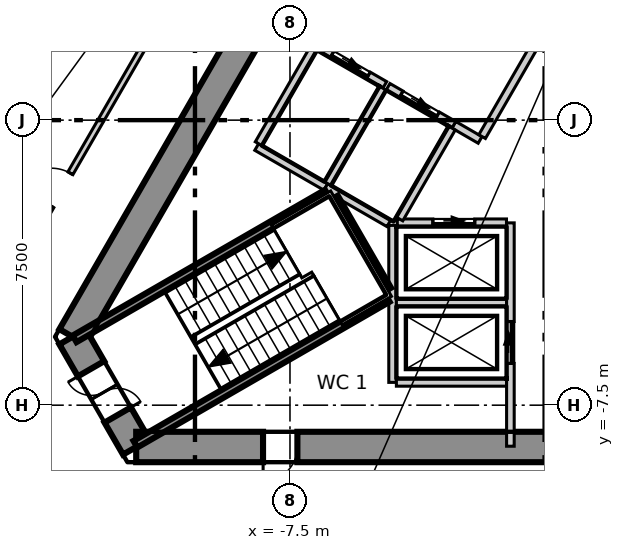
"""IFC4 building model, lengths in metres.
Left out: names, types, materials, properties, quantities, classifications, styles, units other than length and angle.
Written with IfcOpenShell. Run it as: python <this file> out.ifc"""

import sys

from ifc_helpers import new_model, si_unit, direction, frame, frame_2d, origin, place, context, subcontext, project, spatial, polyline, rectangle, outline, extrude, element, fill, save


model = new_model("IFC4")
c1 = context("Model", 3, precision=1e-05, world=origin(), true_north=direction((0.0, 1.0)))
c2 = subcontext(c1, "Body", "Model", "MODEL_VIEW")
j1 = project(units=[si_unit("LENGTHUNIT", "METRE"), si_unit("PLANEANGLEUNIT", "RADIAN")], contexts=[c1])
p1 = place(None, origin())
s1 = spatial("IfcSite", under=j1, at=p1, CompositionType="ELEMENT")
p2 = place(p1, origin())
s2 = spatial("IfcBuilding", under=s1, at=p2, CompositionType="ELEMENT")
p3 = place(p2, frame((0.0, 0.0, 164.3)))
s3 = spatial("IfcBuildingStorey", under=s2, at=p3, CompositionType="ELEMENT", Elevation=164.3)
p4 = place(p3, frame((-1.674, 14.3, -0.3), z_axis=(0.0, 0.0, 1.0), x_axis=(-0.499995765644, -0.866027848477, 0.0)))
e1 = element("IfcWall", 1, at=p4, inside=s3, PredefinedType="SHEAR", context=c2, shape_type="SweptSolid", body=[
    extrude(outline(polyline([(-0.231, -0.4), (1.732, -0.4), (3.695, -0.4), (5.658, -0.4), (7.621, -0.4), (9.584, -0.4), (11.547, -0.4), (13.51, -0.4), (15.473, -0.4), (17.436, -0.4), (19.399, -0.4), (21.362, -0.4), (23.325, -0.4), (22.863, 0.4), (20.977, 0.4), (19.091, 0.4), (17.205, 0.4), (15.319, 0.4), (13.433, 0.4), (11.547, 0.4), (9.661, 0.4), (7.775, 0.4), (5.889, 0.4), (4.003, 0.4), (2.117, 0.4), (0.231, 0.4), (-0.231, -0.4)])), origin(), (0.0, 0.0, 1.0), 4.0),
])
p5 = place(p4, frame((10.997, 0.0, 0.3)))
e2 = element("IfcOpeningElement", 2, at=p5, cuts=e1, PredefinedType="OPENING", context=c2, shape_type="SweptSolid", body=[
    extrude(rectangle(XDim=1.1, YDim=2.1, at=frame_2d((0.55, 1.05))), frame((0.0, 0.41, 0.0), z_axis=(0.0, -1.0, 0.0), x_axis=(1.0, 0.0, 0.0)), (0.0, 0.0, 1.0), 0.82),
])
p6 = place(p3, frame((-13.221, -5.7, -0.3), z_axis=(0.0, 0.0, 1.0), x_axis=(0.49987182685, -0.866099391942, 0.0)))
e3 = element("IfcWall", 3, at=p6, inside=s3, PredefinedType="SHEAR", context=c2, shape_type="SweptSolid", body=[
    extrude(outline(polyline([(-0.231, -0.4), (1.674, -0.4), (3.579, -0.4), (3.118, 0.4), (1.674, 0.4), (0.231, 0.4), (-0.231, -0.4)])), origin(), (0.0, 0.0, 1.0), 4.0),
])
p7 = place(p6, frame((0.974, 0.0, 0.3)))
e4 = element("IfcOpeningElement", 4, at=p7, cuts=e3, PredefinedType="OPENING", context=c2, shape_type="SweptSolid", body=[
    extrude(rectangle(XDim=1.4, YDim=2.1, at=frame_2d((0.7, 1.05))), frame((0.0, 0.41, 0.0), z_axis=(0.0, -1.0, 0.0), x_axis=(1.0, 0.0, 0.0)), (0.0, 0.0, 1.0), 0.82),
])
p8 = place(p3, frame((-11.547, -8.6, -0.3), z_axis=(0.0, 0.0, 1.0), x_axis=(1.0, 0.0, 0.0)))
e5 = element("IfcWall", 5, at=p8, inside=s3, PredefinedType="SHEAR", context=c2, shape_type="SweptSolid", body=[
    extrude(outline(polyline([(-0.231, -0.4), (1.732, -0.4), (3.695, -0.4), (5.658, -0.4), (7.621, -0.4), (9.584, -0.4), (11.547, -0.4), (13.51, -0.4), (15.473, -0.4), (17.436, -0.4), (19.399, -0.4), (21.362, -0.4), (23.325, -0.4), (22.863, 0.4), (20.977, 0.4), (19.091, 0.4), (17.205, 0.4), (15.319, 0.4), (13.433, 0.4), (11.547, 0.4), (9.661, 0.4), (7.775, 0.4), (5.889, 0.4), (4.003, 0.4), (2.117, 0.4), (0.231, 0.4), (-0.231, -0.4)])), origin(), (0.0, 0.0, 1.0), 4.0),
])
p9 = place(p8, frame((3.34, 0.0, 0.3)))
e6 = element("IfcOpeningElement", 6, at=p9, cuts=e5, PredefinedType="OPENING", context=c2, shape_type="SweptSolid", body=[
    extrude(rectangle(XDim=0.9, YDim=2.1, at=frame_2d((0.45, 1.05))), frame((0.0, 0.41, 0.0), z_axis=(0.0, -1.0, 0.0), x_axis=(1.0, 0.0, 0.0)), (0.0, 0.0, 1.0), 0.82),
])
p10 = place(p8, frame((17.722, 0.0, 0.3)))
e7 = element("IfcOpeningElement", 7, at=p10, cuts=e5, PredefinedType="OPENING", context=c2, shape_type="SweptSolid", body=[
    extrude(rectangle(XDim=0.9, YDim=2.1, at=frame_2d((0.45, 1.05))), frame((0.0, 0.41, 0.0), z_axis=(0.0, -1.0, 0.0), x_axis=(1.0, 0.0, 0.0)), (0.0, 0.0, 1.0), 0.82),
])
p11 = place(p3, frame((-2.972, 33.16, 0.0), z_axis=(0.0, 0.0, 1.0), x_axis=(-0.500009959561, -0.866019653553, 0.0)))
e8 = element("IfcWall", 8, at=p11, inside=s3, PredefinedType="ELEMENTEDWALL", context=c2, shape_type="SweptSolid", body=[
    extrude(rectangle(XDim=54.443, YDim=0.2, at=frame_2d((27.222, 0.0))), origin(), (0.0, 0.0, 1.0), 3.7),
])
p12 = place(p11, frame((2.094, 0.0, 0.9)))
e9 = element("IfcOpeningElement", 9, at=p12, cuts=e8, PredefinedType="OPENING", context=c2, shape_type="SweptSolid", body=[
    extrude(rectangle(XDim=4.9, YDim=2.5, at=frame_2d((2.45, 1.25))), frame((0.0, 0.11, 0.0), z_axis=(0.0, -1.0, 0.0), x_axis=(1.0, 0.0, 0.0)), (0.0, 0.0, 1.0), 0.22),
])
p13 = place(p11, frame((8.576, 0.0, 0.9)))
e10 = element("IfcOpeningElement", 10, at=p13, cuts=e8, PredefinedType="OPENING", context=c2, shape_type="SweptSolid", body=[
    extrude(rectangle(XDim=4.9, YDim=2.5, at=frame_2d((2.45, 1.25))), frame((0.0, 0.11, 0.0), z_axis=(0.0, -1.0, 0.0), x_axis=(1.0, 0.0, 0.0)), (0.0, 0.0, 1.0), 0.22),
])
p14 = place(p11, frame((15.058, 0.0, 0.9)))
e11 = element("IfcOpeningElement", 11, at=p14, cuts=e8, PredefinedType="OPENING", context=c2, shape_type="SweptSolid", body=[
    extrude(rectangle(XDim=4.9, YDim=2.5, at=frame_2d((2.45, 1.25))), frame((0.0, 0.11, 0.0), z_axis=(0.0, -1.0, 0.0), x_axis=(1.0, 0.0, 0.0)), (0.0, 0.0, 1.0), 0.22),
])
p15 = place(p11, frame((21.54, 0.0, 0.9)))
e12 = element("IfcOpeningElement", 12, at=p15, cuts=e8, PredefinedType="OPENING", context=c2, shape_type="SweptSolid", body=[
    extrude(rectangle(XDim=4.9, YDim=2.5, at=frame_2d((2.45, 1.25))), frame((0.0, 0.11, 0.0), z_axis=(0.0, -1.0, 0.0), x_axis=(1.0, 0.0, 0.0)), (0.0, 0.0, 1.0), 0.22),
])
p16 = place(p11, frame((28.022, 0.0, 0.9)))
e13 = element("IfcOpeningElement", 13, at=p16, cuts=e8, PredefinedType="OPENING", context=c2, shape_type="SweptSolid", body=[
    extrude(rectangle(XDim=4.9, YDim=2.5, at=frame_2d((2.45, 1.25))), frame((0.0, 0.11, 0.0), z_axis=(0.0, -1.0, 0.0), x_axis=(1.0, 0.0, 0.0)), (0.0, 0.0, 1.0), 0.22),
])
p17 = place(p11, frame((34.505, 0.0, 0.9)))
e14 = element("IfcOpeningElement", 14, at=p17, cuts=e8, PredefinedType="OPENING", context=c2, shape_type="SweptSolid", body=[
    extrude(rectangle(XDim=4.9, YDim=2.5, at=frame_2d((2.45, 1.25))), frame((0.0, 0.11, 0.0), z_axis=(0.0, -1.0, 0.0), x_axis=(1.0, 0.0, 0.0)), (0.0, 0.0, 1.0), 0.22),
])
p18 = place(p11, frame((40.987, 0.0, 0.9)))
e15 = element("IfcOpeningElement", 15, at=p18, cuts=e8, PredefinedType="OPENING", context=c2, shape_type="SweptSolid", body=[
    extrude(rectangle(XDim=4.9, YDim=2.5, at=frame_2d((2.45, 1.25))), frame((0.0, 0.11, 0.0), z_axis=(0.0, -1.0, 0.0), x_axis=(1.0, 0.0, 0.0)), (0.0, 0.0, 1.0), 0.22),
])
p19 = place(p11, frame((47.469, 0.0, 0.9)))
e16 = element("IfcOpeningElement", 16, at=p19, cuts=e8, PredefinedType="OPENING", context=c2, shape_type="SweptSolid", body=[
    extrude(rectangle(XDim=4.9, YDim=2.5, at=frame_2d((2.45, 1.25))), frame((0.0, 0.11, 0.0), z_axis=(0.0, -1.0, 0.0), x_axis=(1.0, 0.0, 0.0)), (0.0, 0.0, 1.0), 0.22),
])
p20 = place(p3, frame((-18.631, -10.669, 0.0), z_axis=(0.0, 0.0, 1.0), x_axis=(0.500000173646, 0.86602530353, 0.0)))
e17 = element("IfcWall", 17, at=p20, inside=s3, PredefinedType="PARTITIONING", context=c2, shape_type="SweptSolid", body=[
    extrude(rectangle(XDim=17.654, YDim=0.15, at=frame_2d((8.827, 0.0))), origin(), (0.0, 0.0, 1.0), 3.7),
])
p21 = place(p20, frame((9.705, 0.0, 0.0)))
e18 = element("IfcOpeningElement", 18, at=p21, cuts=e17, PredefinedType="OPENING", context=c2, shape_type="SweptSolid", body=[
    extrude(rectangle(XDim=1.0, YDim=2.1, at=frame_2d((0.5, 1.05))), frame((0.0, 0.085, 0.0), z_axis=(0.0, -1.0, 0.0), x_axis=(1.0, 0.0, 0.0)), (0.0, 0.0, 1.0), 0.17),
])
p22 = place(p20, frame((2.141, 0.0, 0.0)))
e19 = element("IfcOpeningElement", 19, at=p22, cuts=e17, PredefinedType="OPENING", context=c2, shape_type="SweptSolid", body=[
    extrude(rectangle(XDim=1.1, YDim=2.1, at=frame_2d((0.55, 1.05))), frame((0.0, 0.085, 0.0), z_axis=(0.0, -1.0, 0.0), x_axis=(1.0, 0.0, 0.0)), (0.0, 0.0, 1.0), 0.17),
])
p23 = place(p3, frame((-8.376, -0.707, 0.0), z_axis=(0.0, 0.0, 1.0), x_axis=(0.866067520717, -0.499927044236, 0.0)))
e20 = element("IfcWall", 20, at=p23, inside=s3, PredefinedType="SOLIDWALL", context=c2, shape_type="SweptSolid", body=[
    extrude(rectangle(XDim=2.1, YDim=0.2, at=frame_2d((1.05, 0.0))), origin(), (0.0, 0.0, 1.0), 3.7),
])
p24 = place(p3, frame((-8.326, -0.62, 0.0), z_axis=(0.0, 0.0, 1.0), x_axis=(0.500023687443, 0.866011727401, 0.0)))
e21 = element("IfcWall", 21, at=p24, inside=s3, PredefinedType="SOLIDWALL", context=c2, shape_type="SweptSolid", body=[
    extrude(rectangle(XDim=2.9, YDim=0.2, at=frame_2d((1.45, 0.0))), origin(), (0.0, 0.0, 1.0), 3.7),
])
p25 = place(p3, frame((-4.8, -6.9, 0.0), z_axis=(0.0, 0.0, 1.0), x_axis=(0.0, 1.0, 0.0)))
e22 = element("IfcWall", 22, at=p25, inside=s3, PredefinedType="SOLIDWALL", context=c2, shape_type="SweptSolid", body=[
    extrude(rectangle(XDim=4.131, YDim=0.2, at=frame_2d((2.065, 0.0))), origin(), (0.0, 0.0, 1.0), 3.7),
])
for number, where, z_axis, x_axis in (
    (23, (-4.7, -6.9, 0.0), (0.0, 0.0, 1.0), (1.0, 0.0, 0.0)),
    (24, (-4.7, -4.8, 0.0), (0.0, 0.0, 1.0), (1.0, 0.0, 0.0)),
):
    element("IfcWall", number, at=place(p3, frame(where, z_axis=z_axis, x_axis=x_axis)), inside=s3, PredefinedType="SOLIDWALL", context=c2, shape_type="SweptSolid", body=[
        extrude(rectangle(XDim=2.9, YDim=0.2, at=frame_2d((1.45, 0.0))), origin(), (0.0, 0.0, 1.0), 3.7),
    ])
p26 = place(p3, frame((-1.7, -8.58, 0.0), z_axis=(0.0, 0.0, 1.0), x_axis=(0.0, 1.0, 0.0)))
e25 = element("IfcWall", 25, at=p26, inside=s3, PredefinedType="SOLIDWALL", context=c2, shape_type="SweptSolid", body=[
    extrude(rectangle(XDim=5.877, YDim=0.2, at=frame_2d((2.938, 0.0))), origin(), (0.0, 0.0, 1.0), 3.7),
])
p27 = place(p26, frame((2.18, 0.0, 0.0)))
e26 = element("IfcOpeningElement", 26, at=p27, cuts=e25, PredefinedType="OPENING", context=c2, shape_type="SweptSolid", body=[
    extrude(rectangle(XDim=1.1, YDim=2.1, at=frame_2d((0.55, 1.05))), frame((0.0, 0.11, 0.0), z_axis=(0.0, -1.0, 0.0), x_axis=(1.0, 0.0, 0.0)), (0.0, 0.0, 1.0), 0.22),
])
p28 = place(p3, frame((-4.676, -2.7, 0.0), z_axis=(0.0, 0.0, 1.0), x_axis=(1.0, 0.0, 0.0)))
e27 = element("IfcWall", 27, at=p28, inside=s3, PredefinedType="SOLIDWALL", context=c2, shape_type="SweptSolid", body=[
    extrude(rectangle(XDim=2.873, YDim=0.2, at=frame_2d((1.437, 0.0))), origin(), (0.0, 0.0, 1.0), 3.7),
])
p29 = place(p28, frame((0.937, 0.0, 0.0)))
e28 = element("IfcOpeningElement", 28, at=p29, cuts=e27, PredefinedType="OPENING", context=c2, shape_type="SweptSolid", body=[
    extrude(rectangle(XDim=1.1, YDim=2.1, at=frame_2d((0.55, 1.05))), frame((0.0, 0.11, 0.0), z_axis=(0.0, -1.0, 0.0), x_axis=(1.0, 0.0, 0.0)), (0.0, 0.0, 1.0), 0.22),
])
p30 = place(p3, frame((-8.28, 2.818, 0.0), z_axis=(0.0, 0.0, 1.0), x_axis=(0.86600175068, -0.50004096614, 0.0)))
e29 = element("IfcWall", 29, at=p30, inside=s3, PredefinedType="SOLIDWALL", context=c2, shape_type="SweptSolid", body=[
    extrude(rectangle(XDim=3.782, YDim=0.2, at=frame_2d((1.891, 0.0))), origin(), (0.0, 0.0, 1.0), 3.7),
])
p31 = place(p30, frame((2.18, 0.0, 0.0)))
e30 = element("IfcOpeningElement", 30, at=p31, cuts=e29, PredefinedType="OPENING", context=c2, shape_type="SweptSolid", body=[
    extrude(rectangle(XDim=1.1, YDim=2.1, at=frame_2d((0.55, 1.05))), frame((0.0, 0.11, 0.0), z_axis=(0.0, -1.0, 0.0), x_axis=(1.0, 0.0, 0.0)), (0.0, 0.0, 1.0), 0.22),
])
p32 = place(p3, frame((-3.188, -0.122, 0.0), z_axis=(0.0, 0.0, 1.0), x_axis=(0.865705793592, -0.50055317294, 0.0)))
e31 = element("IfcWall", 31, at=p32, inside=s3, PredefinedType="SOLIDWALL", context=c2, shape_type="SweptSolid", body=[
    extrude(rectangle(XDim=0.797, YDim=0.2, at=frame_2d((0.398, 0.0))), origin(), (0.0, 0.0, 1.0), 3.7),
])
p33 = place(p3, frame((-2.444, -0.433, 0.0), z_axis=(0.0, 0.0, 1.0), x_axis=(0.500035624827, 0.866004834804, 0.0)))
e32 = element("IfcWall", 32, at=p33, inside=s3, PredefinedType="SOLIDWALL", context=c2, shape_type="SweptSolid", body=[
    extrude(rectangle(XDim=3.194, YDim=0.2, at=frame_2d((1.597, 0.0))), origin(), (0.0, 0.0, 1.0), 3.7),
])
p34 = place(p3, frame((-6.557, -1.757, 0.0), z_axis=(0.0, 0.0, 1.0), x_axis=(0.8659754619, -0.500086491905, 0.0)))
e33 = element("IfcWall", 33, at=p34, inside=s3, PredefinedType="SOLIDWALL", context=c2, shape_type="SweptSolid", body=[
    extrude(rectangle(XDim=1.916, YDim=0.2, at=frame_2d((0.958, 0.0))), origin(), (0.0, 0.0, 1.0), 3.7),
])
p35 = place(p3, frame((-6.507, -1.67, 0.0), z_axis=(0.0, 0.0, 1.0), x_axis=(0.50012328804, 0.865954211699, 0.0)))
e34 = element("IfcWall", 34, at=p35, inside=s3, PredefinedType="SOLIDWALL", context=c2, shape_type="SweptSolid", body=[
    extrude(rectangle(XDim=2.9, YDim=0.2, at=frame_2d((1.45, 0.0))), origin(), (0.0, 0.0, 1.0), 3.7),
])
p36 = place(p3, frame((-4.92, 0.878, 0.0), z_axis=(0.0, 0.0, 1.0), x_axis=(0.866010750942, -0.50002537861, 0.0)))
e35 = element("IfcWall", 35, at=p36, inside=s3, PredefinedType="SOLIDWALL", context=c2, shape_type="SweptSolid", body=[
    extrude(rectangle(XDim=2.0, YDim=0.2, at=frame_2d((1.0, 0.0))), origin(), (0.0, 0.0, 1.0), 3.7),
])
p37 = place(p36, frame((0.4, 0.0, 0.0)))
e36 = element("IfcOpeningElement", 36, at=p37, cuts=e35, PredefinedType="OPENING", context=c2, shape_type="SweptSolid", body=[
    extrude(rectangle(XDim=1.1, YDim=2.1, at=frame_2d((0.55, 1.05))), frame((0.0, 0.11, 0.0), z_axis=(0.0, -1.0, 0.0), x_axis=(1.0, 0.0, 0.0)), (0.0, 0.0, 1.0), 0.22),
])
p38 = place(p3, frame((-4.619, -2.6, 0.0), z_axis=(0.0, 0.0, 1.0), x_axis=(0.50009492287, 0.865970593103, 0.0)))
e37 = element("IfcWall", 37, at=p38, inside=s3, PredefinedType="SOLIDWALL", context=c2, shape_type="SweptSolid", body=[
    extrude(rectangle(XDim=2.761, YDim=0.2, at=frame_2d((1.381, 0.0))), origin(), (0.0, 0.0, 1.0), 3.7),
])
p39 = place(p3, frame((-13.167, -5.754, 0.0), z_axis=(0.0, 0.0, 1.0), x_axis=(0.866060938598, 0.499938446846, 0.0)))
e38 = element("IfcWall", 38, at=p39, inside=s3, PredefinedType="SOLIDWALL", context=c2, shape_type="SweptSolid", body=[
    extrude(rectangle(XDim=7.665, YDim=0.2, at=frame_2d((3.832, 0.0))), origin(), (0.0, 0.0, 1.0), 3.7),
])
p40 = place(p3, frame((-6.329, -2.038, 0.0), z_axis=(0.0, 0.0, 1.0), x_axis=(0.500200581029, -0.865909567298, 0.0)))
e39 = element("IfcWall", 39, at=p40, inside=s3, PredefinedType="SOLIDWALL", context=c2, shape_type="SweptSolid", body=[
    extrude(rectangle(XDim=2.799, YDim=0.2, at=frame_2d((1.399, 0.0))), origin(), (0.0, 0.0, 1.0), 3.7),
])
p41 = place(p3, frame((-11.567, -8.526, 0.0), z_axis=(0.0, 0.0, 1.0), x_axis=(0.866005769735, 0.50003400563, 0.0)))
e40 = element("IfcWall", 40, at=p41, inside=s3, PredefinedType="SOLIDWALL", context=c2, shape_type="SweptSolid", body=[
    extrude(rectangle(XDim=7.665, YDim=0.2, at=frame_2d((3.833, 0.0))), origin(), (0.0, 0.0, 1.0), 3.7),
])
p42 = place(p29, origin())
e41 = element("IfcDoor", 41, at=p42, inside=s3, OperationType="SLIDING_TO_LEFT", PredefinedType="DOOR", context=c2, shape_type="SweptSolid", body=[
    extrude(rectangle(XDim=1.1, YDim=2.1, at=frame_2d((0.55, 1.05))), frame((0.0, 0.025, 0.0), z_axis=(0.0, -1.0, 0.0), x_axis=(1.0, 0.0, 0.0)), (0.0, 0.0, 1.0), 0.05),
])
fill(e28, e41)
p43 = place(p27, origin())
e42 = element("IfcDoor", 42, at=p43, inside=s3, OperationType="SLIDING_TO_LEFT", PredefinedType="DOOR", context=c2, shape_type="SweptSolid", body=[
    extrude(rectangle(XDim=1.1, YDim=2.1, at=frame_2d((0.55, 1.05))), frame((0.0, 0.025, 0.0), z_axis=(0.0, -1.0, 0.0), x_axis=(1.0, 0.0, 0.0)), (0.0, 0.0, 1.0), 0.05),
])
fill(e26, e42)
p44 = place(p37, origin())
e43 = element("IfcDoor", 43, at=p44, inside=s3, OperationType="SLIDING_TO_LEFT", PredefinedType="DOOR", context=c2, shape_type="SweptSolid", body=[
    extrude(rectangle(XDim=1.1, YDim=2.1, at=frame_2d((0.55, 1.05))), frame((0.0, 0.025, 0.0), z_axis=(0.0, -1.0, 0.0), x_axis=(1.0, 0.0, 0.0)), (0.0, 0.0, 1.0), 0.05),
])
fill(e36, e43)
p45 = place(p31, origin())
e44 = element("IfcDoor", 44, at=p45, inside=s3, OperationType="SLIDING_TO_LEFT", PredefinedType="DOOR", context=c2, shape_type="SweptSolid", body=[
    extrude(rectangle(XDim=1.1, YDim=2.1, at=frame_2d((0.55, 1.05))), frame((0.0, 0.025, 0.0), z_axis=(0.0, -1.0, 0.0), x_axis=(1.0, 0.0, 0.0)), (0.0, 0.0, 1.0), 0.05),
])
fill(e30, e44)
p46 = place(p21, origin())
e45 = element("IfcDoor", 45, at=p46, inside=s3, OperationType="SINGLE_SWING_RIGHT", PredefinedType="DOOR", context=c2, shape_type="SweptSolid", body=[
    extrude(rectangle(XDim=1.0, YDim=2.1, at=frame_2d((0.5, 1.05))), frame((0.0, 0.025, 0.0), z_axis=(0.0, -1.0, 0.0), x_axis=(1.0, 0.0, 0.0)), (0.0, 0.0, 1.0), 0.05),
])
fill(e18, e45)
p47 = place(p7, origin())
e46 = element("IfcDoor", 46, at=p47, inside=s3, OperationType="DOUBLE_DOOR_SINGLE_SWING", PredefinedType="DOOR", context=c2, shape_type="SweptSolid", body=[
    extrude(rectangle(XDim=1.4, YDim=2.1, at=frame_2d((0.7, 1.05))), frame((0.0, 0.025, 0.0), z_axis=(0.0, -1.0, 0.0), x_axis=(1.0, 0.0, 0.0)), (0.0, 0.0, 1.0), 0.05),
])
fill(e4, e46)
p48 = place(p9, origin())
e47 = element("IfcDoor", 47, at=p48, inside=s3, OperationType="SINGLE_SWING_LEFT", PredefinedType="DOOR", context=c2, shape_type="SweptSolid", body=[
    extrude(rectangle(XDim=0.9, YDim=2.1, at=frame_2d((0.45, 1.05))), frame((0.0, 0.125, 0.0), z_axis=(0.0, -1.0, 0.0), x_axis=(1.0, 0.0, 0.0)), (0.0, 0.0, 1.0), 0.05),
])
fill(e6, e47)
save(model, sys.argv[1])
